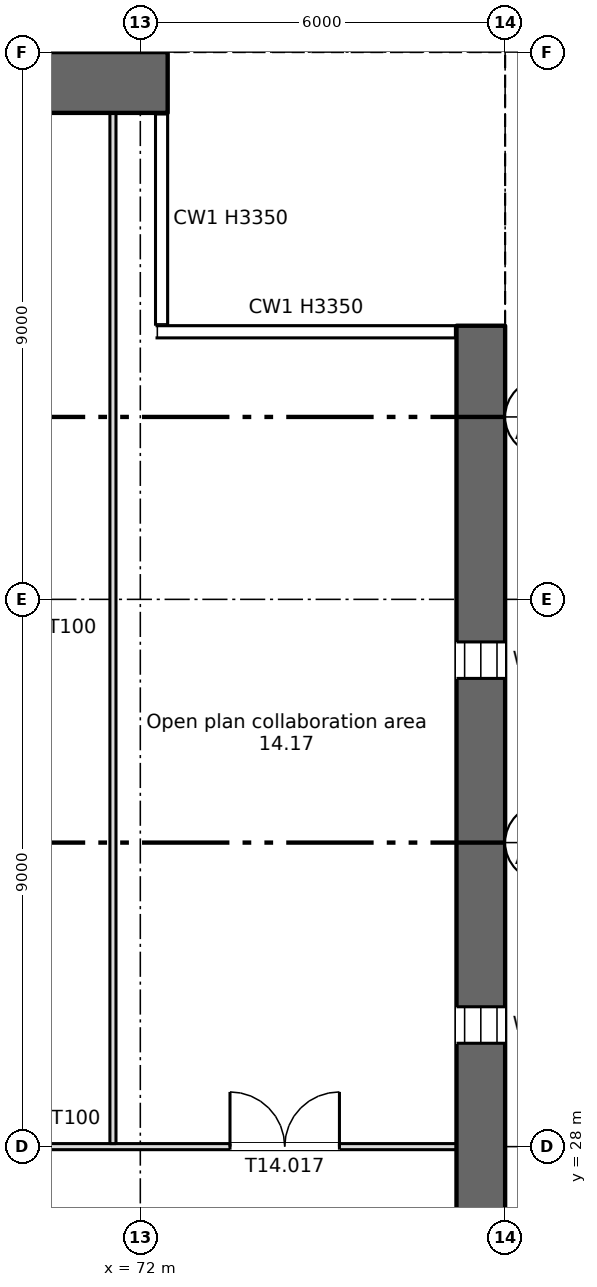
"""IFC4 building model, lengths in metres.
Left out: names, types, materials, properties, quantities, classifications, styles, units other than length and angle.
Written with IfcOpenShell. Run it as: python <this file> out.ifc"""

import sys

from ifc_helpers import new_model, si_unit, direction, frame, frame_2d, origin, place, context, subcontext, project, spatial, rectangle, extrude, element, fill, save


model = new_model("IFC4")
c1 = context("Model", 3, precision=1e-05, world=origin(), true_north=direction((0.0, 1.0)))
c2 = subcontext(c1, "Body", "Model", "MODEL_VIEW")
j1 = project(units=[si_unit("LENGTHUNIT", "METRE"), si_unit("PLANEANGLEUNIT", "RADIAN")], contexts=[c1])
p1 = place(None, origin())
s1 = spatial("IfcSite", under=j1, at=p1, CompositionType="ELEMENT")
p2 = place(p1, origin())
s2 = spatial("IfcBuilding", under=s1, at=p2, CompositionType="ELEMENT")
p3 = place(p2, frame((0.0, 0.0, 78.75)))
s3 = spatial("IfcBuildingStorey", under=s2, at=p3, CompositionType="ELEMENT", Elevation=78.75)
p4 = place(p3, frame((77.6, 4.5, 0.0), z_axis=(0.0, 0.0, 1.0), x_axis=(0.0, 1.0, 0.0)))
e1 = element("IfcWall", 1, at=p4, inside=s3, PredefinedType="SHEAR", context=c2, shape_type="SweptSolid", body=[
    extrude(rectangle(XDim=37.0, YDim=0.8, at=frame_2d((18.5, 0.0))), origin(), (0.0, 0.0, 1.0), 3.35),
])
p5 = place(p4, frame((1.2, 0.0, 0.6)))
e2 = element("IfcOpeningElement", 2, at=p5, cuts=e1, PredefinedType="OPENING", context=c2, shape_type="SweptSolid", body=[
    extrude(rectangle(XDim=0.6, YDim=2.4, at=frame_2d((0.3, 1.2))), frame((0.0, 0.41, 0.0), z_axis=(0.0, -1.0, 0.0), x_axis=(1.0, 0.0, 0.0)), (0.0, 0.0, 1.0), 0.82),
])
p6 = place(p4, frame((7.2, 0.0, 0.6)))
e3 = element("IfcOpeningElement", 3, at=p6, cuts=e1, PredefinedType="OPENING", context=c2, shape_type="SweptSolid", body=[
    extrude(rectangle(XDim=0.6, YDim=2.4, at=frame_2d((0.3, 1.2))), frame((0.0, 0.41, 0.0), z_axis=(0.0, -1.0, 0.0), x_axis=(1.0, 0.0, 0.0)), (0.0, 0.0, 1.0), 0.82),
])
p7 = place(p4, frame((13.2, 0.0, 0.6)))
e4 = element("IfcOpeningElement", 4, at=p7, cuts=e1, PredefinedType="OPENING", context=c2, shape_type="SweptSolid", body=[
    extrude(rectangle(XDim=0.6, YDim=2.4, at=frame_2d((0.3, 1.2))), frame((0.0, 0.41, 0.0), z_axis=(0.0, -1.0, 0.0), x_axis=(1.0, 0.0, 0.0)), (0.0, 0.0, 1.0), 0.82),
])
p8 = place(p4, frame((19.2, 0.0, 0.6)))
e5 = element("IfcOpeningElement", 5, at=p8, cuts=e1, PredefinedType="OPENING", context=c2, shape_type="SweptSolid", body=[
    extrude(rectangle(XDim=0.6, YDim=2.4, at=frame_2d((0.3, 1.2))), frame((0.0, 0.41, 0.0), z_axis=(0.0, -1.0, 0.0), x_axis=(1.0, 0.0, 0.0)), (0.0, 0.0, 1.0), 0.82),
])
p9 = place(p4, frame((25.2, 0.0, 0.6)))
e6 = element("IfcOpeningElement", 6, at=p9, cuts=e1, PredefinedType="OPENING", context=c2, shape_type="SweptSolid", body=[
    extrude(rectangle(XDim=0.6, YDim=2.4, at=frame_2d((0.3, 1.2))), frame((0.0, 0.41, 0.0), z_axis=(0.0, -1.0, 0.0), x_axis=(1.0, 0.0, 0.0)), (0.0, 0.0, 1.0), 0.82),
])
p10 = place(p4, frame((31.2, 0.0, 0.6)))
e7 = element("IfcOpeningElement", 7, at=p10, cuts=e1, PredefinedType="OPENING", context=c2, shape_type="SweptSolid", body=[
    extrude(rectangle(XDim=0.6, YDim=2.4, at=frame_2d((0.3, 1.2))), frame((0.0, 0.41, 0.0), z_axis=(0.0, -1.0, 0.0), x_axis=(1.0, 0.0, 0.0)), (0.0, 0.0, 1.0), 0.82),
])
p11 = place(p3, frame((5.55, 45.5, 0.0), z_axis=(0.0, 0.0, 1.0), x_axis=(1.0, 0.0, 0.0)))
e8 = element("IfcWall", 8, at=p11, inside=s3, PredefinedType="SHEAR", context=c2, shape_type="SweptSolid", body=[
    extrude(rectangle(XDim=66.9, YDim=1.0, at=frame_2d((33.45, 0.0))), origin(), (0.0, 0.0, 1.0), 3.35),
])
p12 = place(p11, frame((7.2, 0.0, 0.6)))
e9 = element("IfcOpeningElement", 9, at=p12, cuts=e8, PredefinedType="OPENING", context=c2, shape_type="SweptSolid", body=[
    extrude(rectangle(XDim=0.6, YDim=2.4, at=frame_2d((0.3, 1.2))), frame((0.0, 0.51, 0.0), z_axis=(0.0, -1.0, 0.0), x_axis=(1.0, 0.0, 0.0)), (0.0, 0.0, 1.0), 1.02),
])
p13 = place(p11, frame((61.2, 0.0, 0.6)))
e10 = element("IfcOpeningElement", 10, at=p13, cuts=e8, PredefinedType="OPENING", context=c2, shape_type="SweptSolid", body=[
    extrude(rectangle(XDim=0.6, YDim=2.4, at=frame_2d((0.3, 1.2))), frame((0.0, 0.51, 0.0), z_axis=(0.0, -1.0, 0.0), x_axis=(1.0, 0.0, 0.0)), (0.0, 0.0, 1.0), 1.02),
])
p14 = place(p3, frame((64.5, 28.0, 0.0), z_axis=(0.0, 0.0, 1.0), x_axis=(1.0, 0.0, 0.0)))
e11 = element("IfcWall", 11, at=p14, inside=s3, PredefinedType="PARTITIONING", context=c2, shape_type="SweptSolid", body=[
    extrude(rectangle(XDim=12.7, YDim=0.1, at=frame_2d((6.35, 0.0))), origin(), (0.0, 0.0, 1.0), 3.35),
])
p15 = place(p14, frame((8.975, 0.0, 0.0)))
e12 = element("IfcOpeningElement", 12, at=p15, cuts=e11, PredefinedType="OPENING", context=c2, shape_type="SweptSolid", body=[
    extrude(rectangle(XDim=1.8, YDim=2.1, at=frame_2d((0.9, 1.05))), frame((0.0, 0.06, 0.0), z_axis=(0.0, -1.0, 0.0), x_axis=(1.0, 0.0, 0.0)), (0.0, 0.0, 1.0), 0.12),
])
p16 = place(p14, frame((2.625, 0.0, 0.0)))
e13 = element("IfcOpeningElement", 13, at=p16, cuts=e11, PredefinedType="OPENING", context=c2, shape_type="SweptSolid", body=[
    extrude(rectangle(XDim=1.8, YDim=2.1, at=frame_2d((0.9, 1.05))), frame((0.0, 0.06, 0.0), z_axis=(0.0, -1.0, 0.0), x_axis=(1.0, 0.0, 0.0)), (0.0, 0.0, 1.0), 0.12),
])
p17 = place(p3, frame((71.55, 28.05, 0.0), z_axis=(0.0, 0.0, 1.0), x_axis=(0.0, 1.0, 0.0)))
e14 = element("IfcWall", 14, at=p17, inside=s3, PredefinedType="PARTITIONING", context=c2, shape_type="SweptSolid", body=[
    extrude(rectangle(XDim=16.95, YDim=0.1, at=frame_2d((8.475, 0.0))), origin(), (0.0, 0.0, 1.0), 3.35),
])
p18 = place(p9, origin())
e15 = element("IfcWindow", 15, at=p18, inside=s3, PartitioningType="SINGLE_PANEL", PredefinedType="WINDOW", context=c2, shape_type="SweptSolid", body=[
    extrude(rectangle(XDim=0.6, YDim=2.4, at=frame_2d((0.3, 1.2))), frame((0.0, 0.03, 0.0), z_axis=(0.0, -1.0, 0.0), x_axis=(1.0, 0.0, 0.0)), (0.0, 0.0, 1.0), 0.06),
])
fill(e6, e15)
p19 = place(p10, origin())
e16 = element("IfcWindow", 16, at=p19, inside=s3, PartitioningType="SINGLE_PANEL", PredefinedType="WINDOW", context=c2, shape_type="SweptSolid", body=[
    extrude(rectangle(XDim=0.6, YDim=2.4, at=frame_2d((0.3, 1.2))), frame((0.0, 0.03, 0.0), z_axis=(0.0, -1.0, 0.0), x_axis=(1.0, 0.0, 0.0)), (0.0, 0.0, 1.0), 0.06),
])
fill(e7, e16)
p20 = place(p15, origin())
e17 = element("IfcDoor", 17, at=p20, inside=s3, OperationType="DOUBLE_DOOR_SINGLE_SWING", PredefinedType="DOOR", context=c2, shape_type="SweptSolid", body=[
    extrude(rectangle(XDim=1.8, YDim=2.1, at=frame_2d((0.9, 1.05))), frame((0.0, 0.025, 0.0), z_axis=(0.0, -1.0, 0.0), x_axis=(1.0, 0.0, 0.0)), (0.0, 0.0, 1.0), 0.05),
])
fill(e12, e17)
save(model, sys.argv[1])
